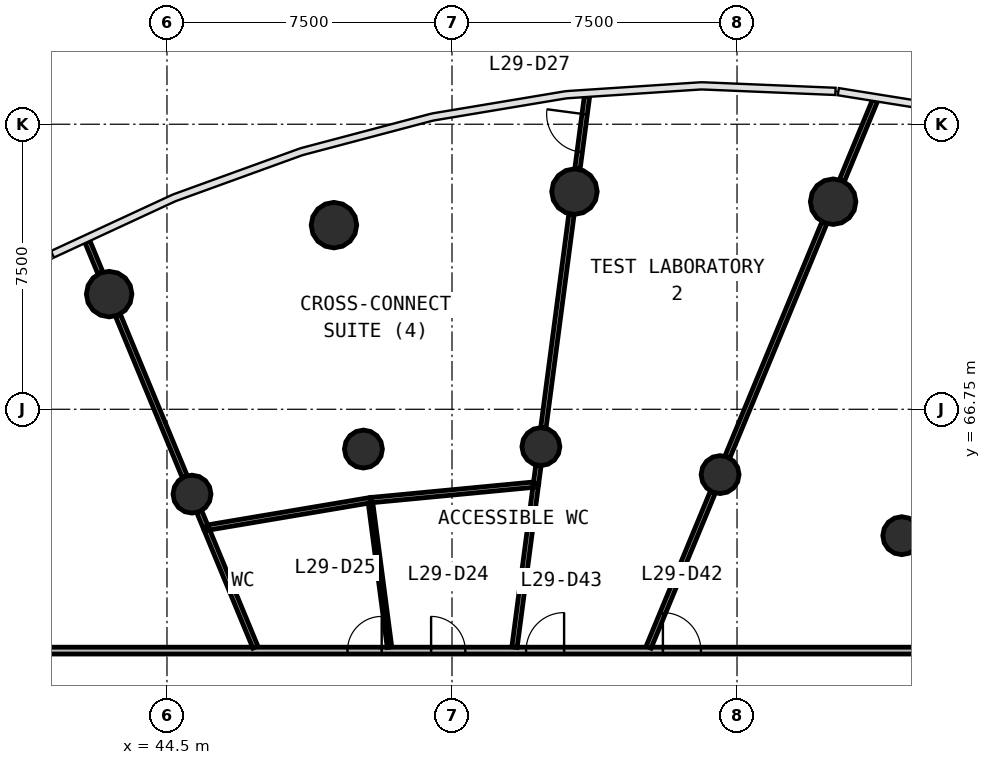
"""IFC4 building model, lengths in metres.
Left out: names, types, materials, properties, quantities, classifications, styles, units other than length and angle.
Written with IfcOpenShell. Run it as: python <this file> out.ifc"""

import sys

from ifc_helpers import new_model, si_unit, direction, frame, frame_2d, origin, origin_2d, place, context, subcontext, project, spatial, rectangle, circle, extrude, source, transform, mapped, element, fill, save


model = new_model("IFC4")
c1 = context("Model", 3, precision=1e-05, world=origin(), true_north=direction((0.0, 1.0)))
c2 = subcontext(c1, "Body", "Model", "MODEL_VIEW")
j1 = project(units=[si_unit("LENGTHUNIT", "METRE"), si_unit("PLANEANGLEUNIT", "RADIAN")], contexts=[c1])
p1 = place(None, origin())
s1 = spatial("IfcSite", under=j1, at=p1, CompositionType="ELEMENT")
p2 = place(p1, origin())
s2 = spatial("IfcBuilding", under=s1, at=p2, CompositionType="ELEMENT")
p3 = place(p2, frame((0.0, 0.0, 124.9)))
s3 = spatial("IfcBuildingStorey", under=s2, at=p3, CompositionType="ELEMENT", Elevation=124.9)
m1 = source(origin(), c2, "Body", "SweptSolid", [
    extrude(circle(Radius=0.6, at=origin_2d()), origin(), (0.0, 0.0, 1.0), 4.1),
])
for number, where, z_axis, x_axis in (
    (1, (62.029, 72.212, 0.0), (0.0, 0.0, 1.0), (1.0, 0.0, 0.0)),
    (2, (55.222, 72.477, 0.0), (0.0, 0.0, 1.0), (1.0, 0.0, 0.0)),
    (3, (48.894, 71.595, 0.0), (0.0, 0.0, 1.0), (1.0, 0.0, 0.0)),
    (4, (42.978, 69.781, 0.0), (0.0, 0.0, 1.0), (1.0, 0.0, 0.0)),
):
    element("IfcColumn", number, at=place(p3, frame(where, z_axis=z_axis, x_axis=x_axis)), inside=s3, PredefinedType="COLUMN", context=c2, shape_type="MappedRepresentation", body=[
        mapped(m1, transform((0.0, 0.0, 0.0), scale=1.0)),
    ])
m2 = source(origin(), c2, "Body", "SweptSolid", [
    extrude(circle(Radius=0.5, at=origin_2d()), origin(), (0.0, 0.0, 1.0), 4.1),
])
for number, where, z_axis, x_axis in (
    (5, (63.835, 63.424, 0.0), (0.0, 0.0, 1.0), (1.0, 0.0, 0.0)),
    (6, (59.055, 65.031, 0.0), (0.0, 0.0, 1.0), (1.0, 0.0, 0.0)),
    (7, (54.339, 65.767, 0.0), (0.0, 0.0, 1.0), (1.0, 0.0, 0.0)),
    (8, (49.669, 65.703, 0.0), (0.0, 0.0, 1.0), (1.0, 0.0, 0.0)),
    (9, (45.158, 64.518, 0.0), (0.0, 0.0, 1.0), (1.0, 0.0, 0.0)),
):
    element("IfcColumn", number, at=place(p3, frame(where, z_axis=z_axis, x_axis=x_axis)), inside=s3, PredefinedType="COLUMN", context=c2, shape_type="MappedRepresentation", body=[
        mapped(m2, transform((0.0, 0.0, 0.0), scale=1.0)),
    ])
p4 = place(p3, frame((36.6, 60.4, 0.0), z_axis=(0.0, 0.0, 1.0), x_axis=(1.0, 0.0, 0.0)))
e10 = element("IfcWall", 10, at=p4, inside=s3, PredefinedType="PARTITIONING", context=c2, shape_type="SweptSolid", body=[
    extrude(rectangle(XDim=30.8, YDim=0.18, at=frame_2d((15.4, 0.0))), origin(), (0.0, 0.0, 1.0), 2.8),
])
p5 = place(p4, frame((14.85, 0.0, 0.0)))
e11 = element("IfcOpeningElement", 11, at=p5, cuts=e10, PredefinedType="OPENING", context=c2, shape_type="SweptSolid", body=[
    extrude(rectangle(XDim=0.9, YDim=2.1, at=frame_2d((0.45, 1.05))), frame((0.0, 0.1, 0.0), z_axis=(0.0, -1.0, 0.0), x_axis=(1.0, 0.0, 0.0)), (0.0, 0.0, 1.0), 0.2),
])
p6 = place(p4, frame((12.65, 0.0, 0.0)))
e12 = element("IfcOpeningElement", 12, at=p6, cuts=e10, PredefinedType="OPENING", context=c2, shape_type="SweptSolid", body=[
    extrude(rectangle(XDim=0.9, YDim=2.1, at=frame_2d((0.45, 1.05))), frame((0.0, 0.1, 0.0), z_axis=(0.0, -1.0, 0.0), x_axis=(1.0, 0.0, 0.0)), (0.0, 0.0, 1.0), 0.2),
])
p7 = place(p4, frame((20.95, 0.0, 0.0)))
e13 = element("IfcOpeningElement", 13, at=p7, cuts=e10, PredefinedType="OPENING", context=c2, shape_type="SweptSolid", body=[
    extrude(rectangle(XDim=1.0, YDim=2.1, at=frame_2d((0.5, 1.05))), frame((0.0, 0.1, 0.0), z_axis=(0.0, -1.0, 0.0), x_axis=(1.0, 0.0, 0.0)), (0.0, 0.0, 1.0), 0.2),
])
p8 = place(p4, frame((17.35, 0.0, 0.0)))
e14 = element("IfcOpeningElement", 14, at=p8, cuts=e10, PredefinedType="OPENING", context=c2, shape_type="SweptSolid", body=[
    extrude(rectangle(XDim=1.0, YDim=2.1, at=frame_2d((0.5, 1.05))), frame((0.0, 0.1, 0.0), z_axis=(0.0, -1.0, 0.0), x_axis=(1.0, 0.0, 0.0)), (0.0, 0.0, 1.0), 0.2),
])
p9 = place(p3, frame((59.248, 65.498, 0.0), z_axis=(0.0, 0.0, 1.0), x_axis=(0.382696989205, 0.923873916968, 0.0)))
e15 = element("IfcWall", 15, at=p9, inside=s3, PredefinedType="PARTITIONING", context=c2, shape_type="SweptSolid", body=[
    extrude(rectangle(XDim=6.663, YDim=0.14, at=frame_2d((3.332, 0.0))), origin(), (0.0, 0.0, 1.0), 2.8),
])
p10 = place(p3, frame((54.405, 66.267, 0.0), z_axis=(0.0, 0.0, 1.0), x_axis=(0.130510314557, 0.991446951578, 0.0)))
e16 = element("IfcWall", 16, at=p10, inside=s3, PredefinedType="PARTITIONING", context=c2, shape_type="SweptSolid", body=[
    extrude(rectangle(XDim=5.659, YDim=0.14, at=frame_2d((2.829, 0.0))), origin(), (0.0, 0.0, 1.0), 2.8),
])
p11 = place(p3, frame((44.965, 64.984, 0.0), z_axis=(0.0, 0.0, 1.0), x_axis=(-0.382705930348, 0.923870213221, 0.0)))
e17 = element("IfcWall", 17, at=p11, inside=s3, PredefinedType="PARTITIONING", context=c2, shape_type="SweptSolid", body=[
    extrude(rectangle(XDim=4.587, YDim=0.14, at=frame_2d((2.293, 0.0))), origin(), (0.0, 0.0, 1.0), 2.8),
])
p12 = place(p3, frame((57.174, 60.49, 0.0), z_axis=(0.0, 0.0, 1.0), x_axis=(0.382672831764, 0.923883923353, 0.0)))
e18 = element("IfcWall", 18, at=p12, inside=s3, PredefinedType="PARTITIONING", context=c2, shape_type="SweptSolid", body=[
    extrude(rectangle(XDim=4.41, YDim=0.14, at=frame_2d((2.205, 0.0))), origin(), (0.0, 0.0, 1.0), 2.8),
])
p13 = place(p3, frame((53.644, 60.49, 0.0), z_axis=(0.0, 0.0, 1.0), x_axis=(0.130508610072, 0.991447175949, 0.0)))
e19 = element("IfcWall", 19, at=p13, inside=s3, PredefinedType="PARTITIONING", context=c2, shape_type="SweptSolid", body=[
    extrude(rectangle(XDim=4.319, YDim=0.14, at=frame_2d((2.16, 0.0))), origin(), (0.0, 0.0, 1.0), 2.8),
])
p14 = place(p3, frame((49.846, 64.358, 0.0), z_axis=(0.0, 0.0, 1.0), x_axis=(-0.986107812708, -0.166106537248, 0.0)))
e20 = element("IfcWall", 20, at=p14, inside=s3, PredefinedType="PARTITIONING", context=c2, shape_type="SweptSolid", body=[
    extrude(rectangle(XDim=4.381, YDim=0.14, at=frame_2d((2.191, 0.0))), origin(), (0.0, 0.0, 1.0), 2.8),
])
p15 = place(p3, frame((54.137, 64.766, 0.0), z_axis=(0.0, 0.0, 1.0), x_axis=(-0.995511610528, -0.094639491254, 0.0)))
e21 = element("IfcWall", 21, at=p15, inside=s3, PredefinedType="PARTITIONING", context=c2, shape_type="SweptSolid", body=[
    extrude(rectangle(XDim=4.28, YDim=0.14, at=frame_2d((2.14, 0.0))), origin(), (0.0, 0.0, 1.0), 2.8),
])
p16 = place(p3, frame((46.826, 60.49, 0.0), z_axis=(0.0, 0.0, 1.0), x_axis=(-0.382649947996, 0.92389340148, 0.0)))
e22 = element("IfcWall", 22, at=p16, inside=s3, PredefinedType="PARTITIONING", context=c2, shape_type="SweptSolid", body=[
    extrude(rectangle(XDim=3.327, YDim=0.14, at=frame_2d((1.663, 0.0))), origin(), (0.0, 0.0, 1.0), 2.8),
])
p17 = place(p3, frame((62.26, 72.771, 0.0), z_axis=(0.0, 0.0, 1.0), x_axis=(0.382697386614, 0.923873752348, 0.0)))
e23 = element("IfcWall", 23, at=p17, inside=s3, PredefinedType="PARTITIONING", context=c2, shape_type="SweptSolid", body=[
    extrude(rectangle(XDim=2.288, YDim=0.14, at=frame_2d((1.144, 0.0))), origin(), (0.0, 0.0, 1.0), 2.8),
])
p18 = place(p3, frame((55.301, 73.076, 0.0), z_axis=(0.0, 0.0, 1.0), x_axis=(0.130527053476, 0.991444747987, 0.0)))
e24 = element("IfcWall", 24, at=p18, inside=s3, PredefinedType="PARTITIONING", context=c2, shape_type="SweptSolid", body=[
    extrude(rectangle(XDim=1.915, YDim=0.14, at=frame_2d((0.958, 0.0))), origin(), (0.0, 0.0, 1.0), 2.8),
])
p19 = place(p18, frame((0.45, 0.0, 0.0)))
e25 = element("IfcOpeningElement", 25, at=p19, cuts=e24, PredefinedType="OPENING", context=c2, shape_type="SweptSolid", body=[
    extrude(rectangle(XDim=1.0, YDim=2.1, at=frame_2d((0.5, 1.05))), frame((0.0, 0.08, 0.0), z_axis=(0.0, -1.0, 0.0), x_axis=(1.0, 0.0, 0.0)), (0.0, 0.0, 1.0), 0.16),
])
p20 = place(p3, frame((42.747, 70.34, 0.0), z_axis=(0.0, 0.0, 1.0), x_axis=(-0.382657128341, 0.923890427556, 0.0)))
e26 = element("IfcWall", 26, at=p20, inside=s3, PredefinedType="PARTITIONING", context=c2, shape_type="SweptSolid", body=[
    extrude(rectangle(XDim=0.895, YDim=0.14, at=frame_2d((0.447, 0.0))), origin(), (0.0, 0.0, 1.0), 2.8),
])
p21 = place(p3, frame((54.212, 64.802, 0.0), z_axis=(0.0, 0.0, 1.0), x_axis=(0.13069696084, 0.991422364297, 0.0)))
e27 = element("IfcWall", 27, at=p21, inside=s3, PredefinedType="PARTITIONING", context=c2, shape_type="SweptSolid", body=[
    extrude(rectangle(XDim=0.469, YDim=0.14, at=frame_2d((0.234, 0.0))), origin(), (0.0, 0.0, 1.0), 2.8),
])
p22 = place(p3, frame((45.514, 63.657, 0.0), z_axis=(0.0, 0.0, 1.0), x_axis=(-0.382334916259, 0.924023815607, 0.0)))
e28 = element("IfcWall", 28, at=p22, inside=s3, PredefinedType="PARTITIONING", context=c2, shape_type="SweptSolid", body=[
    extrude(rectangle(XDim=0.426, YDim=0.14, at=frame_2d((0.213, 0.0))), origin(), (0.0, 0.0, 1.0), 2.8),
])
p23 = place(p3, frame((50.356, 60.49, 0.0), z_axis=(0.0, 0.0, 1.0), x_axis=(-0.130518806164, 0.991445833739, 0.0)))
e29 = element("IfcWall", 29, at=p23, inside=s3, PredefinedType="PARTITIONING", context=c2, shape_type="SweptSolid", body=[
    extrude(rectangle(XDim=3.831, YDim=0.12, at=frame_2d((1.916, 0.0))), origin(), (0.0, 0.0, 1.0), 2.8),
])
m3 = source(origin(), c2, "Body", "SweptSolid", [
    extrude(rectangle(XDim=0.9, YDim=2.1, at=frame_2d((0.45, 1.05))), frame((0.0, 0.025, 0.0), z_axis=(0.0, -1.0, 0.0), x_axis=(1.0, 0.0, 0.0)), (0.0, 0.0, 1.0), 0.05),
])
p24 = place(p5, origin())
e30 = element("IfcDoor", 30, at=p24, inside=s3, OperationType="SINGLE_SWING_LEFT", PredefinedType="DOOR", context=c2, shape_type="MappedRepresentation", body=[
    mapped(m3, transform((0.0, 0.0, 0.0), scale=1.0)),
])
fill(e11, e30)
p25 = place(p6, origin())
e31 = element("IfcDoor", 31, at=p25, inside=s3, OperationType="SINGLE_SWING_RIGHT", PredefinedType="DOOR", context=c2, shape_type="MappedRepresentation", body=[
    mapped(m3, transform((0.0, 0.0, 0.0), scale=1.0)),
])
fill(e12, e31)
m4 = source(origin(), c2, "Body", "SweptSolid", [
    extrude(rectangle(XDim=1.0, YDim=2.1, at=frame_2d((0.5, 1.05))), frame((0.0, 0.025, 0.0), z_axis=(0.0, -1.0, 0.0), x_axis=(1.0, 0.0, 0.0)), (0.0, 0.0, 1.0), 0.05),
])
p26 = place(p19, origin())
e32 = element("IfcDoor", 32, at=p26, inside=s3, OperationType="SINGLE_SWING_RIGHT", PredefinedType="DOOR", context=c2, shape_type="MappedRepresentation", body=[
    mapped(m4, transform((0.0, 0.0, 0.0), scale=1.0)),
])
fill(e25, e32)
p27 = place(p7, origin())
e33 = element("IfcDoor", 33, at=p27, inside=s3, OperationType="SINGLE_SWING_LEFT", PredefinedType="DOOR", context=c2, shape_type="MappedRepresentation", body=[
    mapped(m4, transform((0.0, 0.0, 0.0), scale=1.0)),
])
fill(e13, e33)
p28 = place(p8, origin())
e34 = element("IfcDoor", 34, at=p28, inside=s3, OperationType="SINGLE_SWING_RIGHT", PredefinedType="DOOR", context=c2, shape_type="MappedRepresentation", body=[
    mapped(m4, transform((0.0, 0.0, 0.0), scale=1.0)),
])
fill(e14, e34)
save(model, sys.argv[1])
